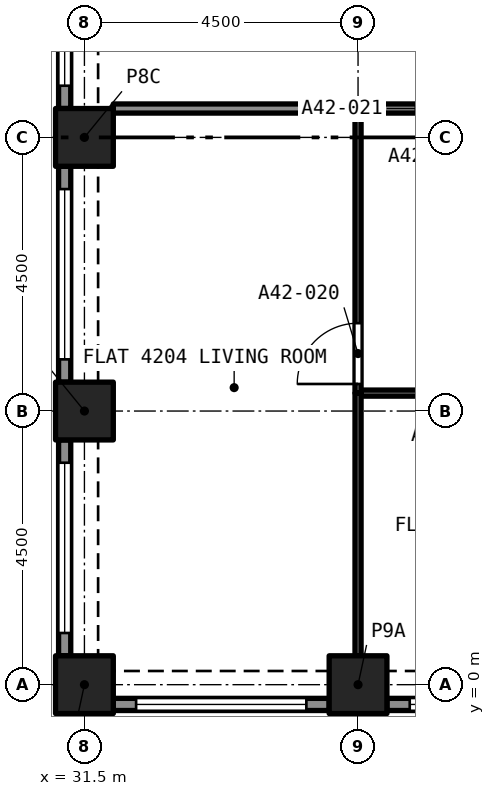
"""IFC4 building model, lengths in metres.
Left out: names, types, materials, properties, quantities, classifications, styles, units other than length and angle.
Written with IfcOpenShell. Run it as: python <this file> out.ifc"""

import sys

from ifc_helpers import new_model, si_unit, direction, frame, frame_2d, origin, origin_2d, place, context, subcontext, project, spatial, rectangle, extrude, element, fill, save


model = new_model("IFC4")
c1 = context("Model", 3, precision=1e-05, world=origin(), true_north=direction((0.0, 1.0)))
c2 = subcontext(c1, "Body", "Model", "MODEL_VIEW")
j1 = project(units=[si_unit("LENGTHUNIT", "METRE"), si_unit("PLANEANGLEUNIT", "RADIAN")], contexts=[c1])
p1 = place(None, origin())
s1 = spatial("IfcSite", under=j1, at=p1, CompositionType="ELEMENT")
p2 = place(p1, origin())
s2 = spatial("IfcBuilding", under=s1, at=p2, CompositionType="ELEMENT")
p3 = place(p2, frame((0.0, 0.0, 150.6)))
s3 = spatial("IfcBuildingStorey", under=s2, at=p3, CompositionType="ELEMENT", Elevation=150.6)
for number, where, z_axis, x_axis in (
    (1, (31.5, 0.0, 0.0), (0.0, 0.0, 1.0), (1.0, 0.0, 0.0)),
    (2, (36.0, 0.0, 0.0), (0.0, 0.0, 1.0), (1.0, 0.0, 0.0)),
    (3, (31.5, 4.5, 0.0), (0.0, 0.0, 1.0), (1.0, 0.0, 0.0)),
    (4, (31.5, 9.0, 0.0), (0.0, 0.0, 1.0), (1.0, 0.0, 0.0)),
):
    element("IfcColumn", number, at=place(p3, frame(where, z_axis=z_axis, x_axis=x_axis)), inside=s3, PredefinedType="COLUMN", context=c2, shape_type="SweptSolid", body=[
        extrude(rectangle(XDim=0.95, YDim=0.95, at=origin_2d()), origin(), (0.0, 0.0, 1.0), 4.4),
    ])
p4 = place(p3, frame((35.525, -0.325, 0.0), z_axis=(0.0, 0.0, 1.0), x_axis=(-1.0, 0.0, 0.0)))
e5 = element("IfcWall", 5, at=p4, inside=s3, PredefinedType="SOLIDWALL", context=c2, shape_type="SweptSolid", body=[
    extrude(rectangle(XDim=3.55, YDim=0.2, at=frame_2d((1.775, 0.0))), origin(), (0.0, 0.0, 1.0), 4.4),
])
p5 = place(p4, frame((0.375, 0.0, 0.45)))
e6 = element("IfcOpeningElement", 6, at=p5, cuts=e5, PredefinedType="OPENING", context=c2, shape_type="SweptSolid", body=[
    extrude(rectangle(XDim=2.8, YDim=2.55, at=frame_2d((1.4, 1.275))), frame((0.0, 0.11, 0.0), z_axis=(0.0, -1.0, 0.0), x_axis=(1.0, 0.0, 0.0)), (0.0, 0.0, 1.0), 0.22),
])
p6 = place(p3, frame((40.025, -0.325, 0.0), z_axis=(0.0, 0.0, 1.0), x_axis=(-1.0, 0.0, 0.0)))
e7 = element("IfcWall", 7, at=p6, inside=s3, PredefinedType="SOLIDWALL", context=c2, shape_type="SweptSolid", body=[
    extrude(rectangle(XDim=3.55, YDim=0.2, at=frame_2d((1.775, 0.0))), origin(), (0.0, 0.0, 1.0), 4.4),
])
p7 = place(p6, frame((0.375, 0.0, 0.45)))
e8 = element("IfcOpeningElement", 8, at=p7, cuts=e7, PredefinedType="OPENING", context=c2, shape_type="SweptSolid", body=[
    extrude(rectangle(XDim=2.8, YDim=2.55, at=frame_2d((1.4, 1.275))), frame((0.0, 0.11, 0.0), z_axis=(0.0, -1.0, 0.0), x_axis=(1.0, 0.0, 0.0)), (0.0, 0.0, 1.0), 0.22),
])
p8 = place(p3, frame((31.175, 9.475, 0.0), z_axis=(0.0, 0.0, 1.0), x_axis=(0.0, 1.0, 0.0)))
e9 = element("IfcWall", 9, at=p8, inside=s3, PredefinedType="SOLIDWALL", context=c2, shape_type="SweptSolid", body=[
    extrude(rectangle(XDim=3.55, YDim=0.2, at=frame_2d((1.775, 0.0))), origin(), (0.0, 0.0, 1.0), 4.4),
])
p9 = place(p8, frame((0.375, 0.0, 0.45)))
e10 = element("IfcOpeningElement", 10, at=p9, cuts=e9, PredefinedType="OPENING", context=c2, shape_type="SweptSolid", body=[
    extrude(rectangle(XDim=2.8, YDim=2.55, at=frame_2d((1.4, 1.275))), frame((0.0, 0.11, 0.0), z_axis=(0.0, -1.0, 0.0), x_axis=(1.0, 0.0, 0.0)), (0.0, 0.0, 1.0), 0.22),
])
p10 = place(p3, frame((31.175, 4.975, 0.0), z_axis=(0.0, 0.0, 1.0), x_axis=(0.0, 1.0, 0.0)))
e11 = element("IfcWall", 11, at=p10, inside=s3, PredefinedType="SOLIDWALL", context=c2, shape_type="SweptSolid", body=[
    extrude(rectangle(XDim=3.55, YDim=0.2, at=frame_2d((1.775, 0.0))), origin(), (0.0, 0.0, 1.0), 4.4),
])
p11 = place(p10, frame((0.375, 0.0, 0.45)))
e12 = element("IfcOpeningElement", 12, at=p11, cuts=e11, PredefinedType="OPENING", context=c2, shape_type="SweptSolid", body=[
    extrude(rectangle(XDim=2.8, YDim=2.55, at=frame_2d((1.4, 1.275))), frame((0.0, 0.11, 0.0), z_axis=(0.0, -1.0, 0.0), x_axis=(1.0, 0.0, 0.0)), (0.0, 0.0, 1.0), 0.22),
])
p12 = place(p3, frame((31.175, 0.475, 0.0), z_axis=(0.0, 0.0, 1.0), x_axis=(0.0, 1.0, 0.0)))
e13 = element("IfcWall", 13, at=p12, inside=s3, PredefinedType="SOLIDWALL", context=c2, shape_type="SweptSolid", body=[
    extrude(rectangle(XDim=3.55, YDim=0.2, at=frame_2d((1.775, 0.0))), origin(), (0.0, 0.0, 1.0), 4.4),
])
p13 = place(p12, frame((0.375, 0.0, 0.45)))
e14 = element("IfcOpeningElement", 14, at=p13, cuts=e13, PredefinedType="OPENING", context=c2, shape_type="SweptSolid", body=[
    extrude(rectangle(XDim=2.8, YDim=2.55, at=frame_2d((1.4, 1.275))), frame((0.0, 0.11, 0.0), z_axis=(0.0, -1.0, 0.0), x_axis=(1.0, 0.0, 0.0)), (0.0, 0.0, 1.0), 0.22),
])
p14 = place(p3, frame((40.4, 4.795, 0.0), z_axis=(0.0, 0.0, 1.0), x_axis=(-1.0, 0.0, 0.0)))
e15 = element("IfcWall", 15, at=p14, inside=s3, PredefinedType="PARTITIONING", context=c2, shape_type="SweptSolid", body=[
    extrude(rectangle(XDim=4.35, YDim=0.1, at=frame_2d((2.175, 0.0))), origin(), (0.0, 0.0, 1.0), 4.1),
])
p15 = place(p14, frame((1.7, 0.0, 0.0)))
e16 = element("IfcOpeningElement", 16, at=p15, cuts=e15, PredefinedType="OPENING", context=c2, shape_type="SweptSolid", body=[
    extrude(rectangle(XDim=0.9, YDim=2.1, at=frame_2d((0.45, 1.05))), frame((0.0, 0.06, 0.0), z_axis=(0.0, -1.0, 0.0), x_axis=(1.0, 0.0, 0.0)), (0.0, 0.0, 1.0), 0.12),
])
p16 = place(p3, frame((36.0, 0.475, 0.0), z_axis=(0.0, 0.0, 1.0), x_axis=(0.0, 1.0, 0.0)))
e17 = element("IfcWall", 17, at=p16, inside=s3, PredefinedType="PARTITIONING", context=c2, shape_type="SweptSolid", body=[
    extrude(rectangle(XDim=4.32, YDim=0.1, at=frame_2d((2.16, 0.0))), origin(), (0.0, 0.0, 1.0), 4.1),
])
p17 = place(p3, frame((36.0, 4.795, 0.0), z_axis=(0.0, 0.0, 1.0), x_axis=(0.0, 1.0, 0.0)))
e18 = element("IfcWall", 18, at=p17, inside=s3, PredefinedType="PARTITIONING", context=c2, shape_type="SweptSolid", body=[
    extrude(rectangle(XDim=4.605, YDim=0.1, at=frame_2d((2.302, 0.0))), origin(), (0.0, 0.0, 1.0), 4.1),
])
p18 = place(p17, frame((0.15, 0.0, 0.0)))
e19 = element("IfcOpeningElement", 19, at=p18, cuts=e18, PredefinedType="OPENING", context=c2, shape_type="SweptSolid", body=[
    extrude(rectangle(XDim=1.0, YDim=2.1, at=frame_2d((0.5, 1.05))), frame((0.0, 0.06, 0.0), z_axis=(0.0, -1.0, 0.0), x_axis=(1.0, 0.0, 0.0)), (0.0, 0.0, 1.0), 0.12),
])
p19 = place(p3, frame((38.35, 9.475, 0.0), z_axis=(0.0, 0.0, 1.0), x_axis=(-1.0, 0.0, 0.0)))
e20 = element("IfcWall", 20, at=p19, inside=s3, PredefinedType="PARTITIONING", context=c2, shape_type="SweptSolid", body=[
    extrude(rectangle(XDim=2.35, YDim=0.15, at=frame_2d((1.175, 0.0))), origin(), (0.0, 0.0, 1.0), 4.1),
])
p20 = place(p19, frame((0.2, 0.0, 0.0)))
e21 = element("IfcOpeningElement", 21, at=p20, cuts=e20, PredefinedType="OPENING", context=c2, shape_type="SweptSolid", body=[
    extrude(rectangle(XDim=1.2, YDim=2.4, at=frame_2d((0.6, 1.2))), frame((0.0, 0.085, 0.0), z_axis=(0.0, -1.0, 0.0), x_axis=(1.0, 0.0, 0.0)), (0.0, 0.0, 1.0), 0.17),
])
p21 = place(p3, frame((31.975, 9.475, 0.0), z_axis=(0.0, 0.0, 1.0), x_axis=(1.0, 0.0, 0.0)))
e22 = element("IfcWall", 22, at=p21, inside=s3, PredefinedType="PARTITIONING", context=c2, shape_type="SweptSolid", body=[
    extrude(rectangle(XDim=4.025, YDim=0.15, at=frame_2d((2.012, 0.0))), origin(), (0.0, 0.0, 1.0), 4.1),
])
p22 = place(p5, origin())
e23 = element("IfcWindow", 23, at=p22, inside=s3, PartitioningType="SINGLE_PANEL", PredefinedType="WINDOW", context=c2, shape_type="SweptSolid", body=[
    extrude(rectangle(XDim=2.8, YDim=2.55, at=frame_2d((1.4, 1.275))), frame((0.0, 0.03, 0.0), z_axis=(0.0, -1.0, 0.0), x_axis=(1.0, 0.0, 0.0)), (0.0, 0.0, 1.0), 0.06),
])
fill(e6, e23)
p23 = place(p7, origin())
e24 = element("IfcWindow", 24, at=p23, inside=s3, PartitioningType="SINGLE_PANEL", PredefinedType="WINDOW", context=c2, shape_type="SweptSolid", body=[
    extrude(rectangle(XDim=2.8, YDim=2.55, at=frame_2d((1.4, 1.275))), frame((0.0, 0.03, 0.0), z_axis=(0.0, -1.0, 0.0), x_axis=(1.0, 0.0, 0.0)), (0.0, 0.0, 1.0), 0.06),
])
fill(e8, e24)
p24 = place(p9, origin())
e25 = element("IfcWindow", 25, at=p24, inside=s3, PartitioningType="SINGLE_PANEL", PredefinedType="WINDOW", context=c2, shape_type="SweptSolid", body=[
    extrude(rectangle(XDim=2.8, YDim=2.55, at=frame_2d((1.4, 1.275))), frame((0.0, 0.03, 0.0), z_axis=(0.0, -1.0, 0.0), x_axis=(1.0, 0.0, 0.0)), (0.0, 0.0, 1.0), 0.06),
])
fill(e10, e25)
p25 = place(p11, origin())
e26 = element("IfcWindow", 26, at=p25, inside=s3, PartitioningType="SINGLE_PANEL", PredefinedType="WINDOW", context=c2, shape_type="SweptSolid", body=[
    extrude(rectangle(XDim=2.8, YDim=2.55, at=frame_2d((1.4, 1.275))), frame((0.0, 0.03, 0.0), z_axis=(0.0, -1.0, 0.0), x_axis=(1.0, 0.0, 0.0)), (0.0, 0.0, 1.0), 0.06),
])
fill(e12, e26)
p26 = place(p13, origin())
e27 = element("IfcWindow", 27, at=p26, inside=s3, PartitioningType="SINGLE_PANEL", PredefinedType="WINDOW", context=c2, shape_type="SweptSolid", body=[
    extrude(rectangle(XDim=2.8, YDim=2.55, at=frame_2d((1.4, 1.275))), frame((0.0, 0.03, 0.0), z_axis=(0.0, -1.0, 0.0), x_axis=(1.0, 0.0, 0.0)), (0.0, 0.0, 1.0), 0.06),
])
fill(e14, e27)
p27 = place(p18, origin())
e28 = element("IfcDoor", 28, at=p27, inside=s3, OperationType="SINGLE_SWING_LEFT", PredefinedType="DOOR", context=c2, shape_type="SweptSolid", body=[
    extrude(rectangle(XDim=1.0, YDim=2.1, at=frame_2d((0.5, 1.05))), frame((0.0, 0.025, 0.0), z_axis=(0.0, -1.0, 0.0), x_axis=(1.0, 0.0, 0.0)), (0.0, 0.0, 1.0), 0.05),
])
fill(e19, e28)
save(model, sys.argv[1])
